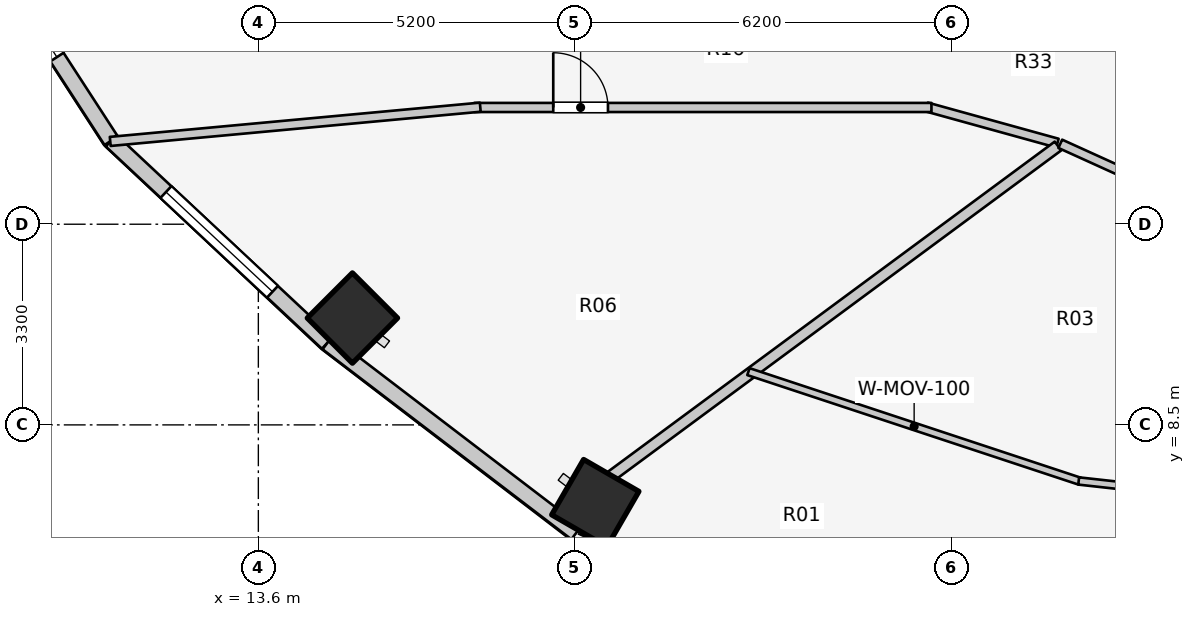
"""IFC4 building model, lengths in metres.
Left out: names, types, materials, properties, quantities, classifications, styles, units other than length and angle.
Written with IfcOpenShell. Run it as: python <this file> out.ifc"""

import sys

from ifc_helpers import new_model, si_unit, direction, frame, frame_2d, origin, origin_2d, place, context, subcontext, project, spatial, rectangle, extrude, element, fill, save


model = new_model("IFC4")
c1 = context("Model", 3, precision=1e-05, world=origin(), true_north=direction((0.0, 1.0)))
c2 = subcontext(c1, "Body", "Model", "MODEL_VIEW")
j1 = project(units=[si_unit("LENGTHUNIT", "METRE"), si_unit("PLANEANGLEUNIT", "RADIAN")], contexts=[c1])
p1 = place(None, origin())
s1 = spatial("IfcSite", under=j1, at=p1, CompositionType="ELEMENT")
p2 = place(p1, origin())
s2 = spatial("IfcBuilding", under=s1, at=p2, CompositionType="ELEMENT")
p3 = place(p2, frame((0.0, 0.0, 94.9)))
s3 = spatial("IfcBuildingStorey", under=s2, at=p3, CompositionType="ELEMENT", Elevation=94.9)
for number, where, z_axis, x_axis in (
    (1, (15.147, 10.257, 0.0), (0.0, 0.0, 1.0), (-0.707, -0.707, 0.0)),
    (2, (19.142, 7.214, 0.0), (0.0, 0.0, 1.0), (-0.5, -0.866, 0.0)),
):
    element("IfcColumn", number, at=place(p3, frame(where, z_axis=z_axis, x_axis=x_axis)), inside=s3, PredefinedType="COLUMN", context=c2, shape_type="SweptSolid", body=[
        extrude(rectangle(XDim=1.05, YDim=1.05, at=origin_2d()), origin(), (0.0, 0.0, 1.0), 3.1),
    ])
p4 = place(p3, frame((8.578, 17.181, 0.0), z_axis=(0.0, 0.0, 1.0), x_axis=(0.544388392991, -0.838833283541, 0.0)))
e3 = element("IfcWall", 3, at=p4, inside=s3, PredefinedType="STANDARD", context=c2, shape_type="SweptSolid", body=[
    extrude(rectangle(XDim=4.778, YDim=0.26, at=frame_2d((2.389, 0.0))), origin(), (0.0, 0.0, 1.0), 2.85),
])
p5 = place(p4, frame((1.639, 0.0, 0.75)))
e4 = element("IfcOpeningElement", 4, at=p5, cuts=e3, PredefinedType="OPENING", context=c2, shape_type="SweptSolid", body=[
    extrude(rectangle(XDim=1.5, YDim=1.6, at=frame_2d((0.75, 0.8))), frame((0.0, 0.14, 0.0), z_axis=(0.0, -1.0, 0.0), x_axis=(1.0, 0.0, 0.0)), (0.0, 0.0, 1.0), 0.28),
])
p6 = place(p3, frame((11.179, 13.173, 0.0), z_axis=(0.0, 0.0, 1.0), x_axis=(0.730162452258, -0.68327358599, 0.0)))
e5 = element("IfcWall", 5, at=p6, inside=s3, PredefinedType="STANDARD", context=c2, shape_type="SweptSolid", body=[
    extrude(rectangle(XDim=4.868, YDim=0.26, at=frame_2d((2.434, 0.0))), origin(), (0.0, 0.0, 1.0), 2.85),
])
p7 = place(p6, frame((1.234, 0.0, 0.75)))
e6 = element("IfcOpeningElement", 6, at=p7, cuts=e5, PredefinedType="OPENING", context=c2, shape_type="SweptSolid", body=[
    extrude(rectangle(XDim=2.4, YDim=1.7, at=frame_2d((1.2, 0.85))), frame((0.0, 0.14, 0.0), z_axis=(0.0, -1.0, 0.0), x_axis=(1.0, 0.0, 0.0)), (0.0, 0.0, 1.0), 0.28),
])
p8 = place(p3, frame((14.734, 9.847, 0.0), z_axis=(0.0, 0.0, 1.0), x_axis=(0.794809810864, -0.606858603427, 0.0)))
e7 = element("IfcWall", 7, at=p8, inside=s3, PredefinedType="STANDARD", context=c2, shape_type="SweptSolid", body=[
    extrude(rectangle(XDim=5.149, YDim=0.26, at=frame_2d((2.575, 0.0))), origin(), (0.0, 0.0, 1.0), 2.85),
])
p9 = place(p3, frame((26.742, 13.133, 0.0), z_axis=(0.0, 0.0, 1.0), x_axis=(-0.963833843713, 0.266503886865, 0.0)))
e8 = element("IfcWall", 8, at=p9, inside=s3, PredefinedType="PARTITIONING", context=c2, shape_type="SweptSolid", body=[
    extrude(rectangle(XDim=2.232, YDim=0.15, at=frame_2d((1.116, 0.0))), origin(), (0.0, 0.0, 1.0), 2.272),
])
p10 = place(p3, frame((17.15, 13.72, 0.0), z_axis=(0.0, 0.0, 1.0), x_axis=(1.0, 0.0, 0.0)))
e9 = element("IfcWall", 9, at=p10, inside=s3, PredefinedType="PARTITIONING", context=c2, shape_type="SweptSolid", body=[
    extrude(rectangle(XDim=7.52, YDim=0.15, at=frame_2d((3.76, 0.0))), origin(), (0.0, 0.0, 1.0), 2.272),
])
p11 = place(p10, frame((1.3, 0.0, 0.0)))
e10 = element("IfcOpeningElement", 10, at=p11, cuts=e9, PredefinedType="OPENING", context=c2, shape_type="SweptSolid", body=[
    extrude(rectangle(XDim=0.9, YDim=2.1, at=frame_2d((0.45, 1.05))), frame((0.0, 0.085, 0.0), z_axis=(0.0, -1.0, 0.0), x_axis=(1.0, 0.0, 0.0)), (0.0, 0.0, 1.0), 0.17),
])
p12 = place(p3, frame((17.25, 13.725, 0.0), z_axis=(0.0, 0.0, 1.0), x_axis=(-0.995748209098, -0.092116795851, 0.0)))
e11 = element("IfcWall", 11, at=p12, inside=s3, PredefinedType="PARTITIONING", context=c2, shape_type="SweptSolid", body=[
    extrude(rectangle(XDim=6.112, YDim=0.15, at=frame_2d((3.056, 0.0))), origin(), (0.0, 0.0, 1.0), 2.142),
])
p13 = place(p3, frame((26.751, 13.086, 0.0), z_axis=(0.0, 0.0, 1.0), x_axis=(-0.80430981394, -0.594210167533, 0.0)))
e12 = element("IfcWall", 12, at=p13, inside=s3, PredefinedType="PARTITIONING", context=c2, shape_type="SweptSolid", body=[
    extrude(rectangle(XDim=9.146, YDim=0.18, at=frame_2d((4.573, 0.0))), origin(), (0.0, 0.0, 1.0), 2.272),
])
p14 = place(p3, frame((21.66, 9.376, 0.0), z_axis=(0.0, 0.0, 1.0), x_axis=(0.949429126756, -0.313981421852, 0.0)))
e13 = element("IfcWall", 13, at=p14, inside=s3, PredefinedType="MOVABLE", context=c2, shape_type="SweptSolid", body=[
    extrude(rectangle(XDim=5.741, YDim=0.12, at=frame_2d((2.87, 0.0))), origin(), (0.0, 0.0, 1.0), 2.272),
])
p15 = place(p3, frame((27.091, 7.578, 0.0), z_axis=(0.0, 0.0, 1.0), x_axis=(0.993892154322, -0.110355722898, 0.0)))
e14 = element("IfcWall", 14, at=p15, inside=s3, PredefinedType="MOVABLE", context=c2, shape_type="SweptSolid", body=[
    extrude(rectangle(XDim=4.949, YDim=0.12, at=frame_2d((2.475, 0.0))), origin(), (0.0, 0.0, 1.0), 2.272),
])
p16 = place(p15, frame((2.0, 0.0, 0.0)))
e15 = element("IfcOpeningElement", 15, at=p16, cuts=e14, PredefinedType="OPENING", context=c2, shape_type="SweptSolid", body=[
    extrude(rectangle(XDim=0.95, YDim=2.1, at=frame_2d((0.475, 1.05))), frame((0.0, 0.07, 0.0), z_axis=(0.0, -1.0, 0.0), x_axis=(1.0, 0.0, 0.0)), (0.0, 0.0, 1.0), 0.14),
])
p17 = place(p3, frame((26.789, 13.123, 0.0), z_axis=(0.0, 0.0, 1.0), x_axis=(0.910568469686, -0.41335827319, 0.0)))
e16 = element("IfcWall", 16, at=p17, inside=s3, PredefinedType="PARTITIONING", context=c2, shape_type="SweptSolid", body=[
    extrude(rectangle(XDim=2.772, YDim=0.15, at=frame_2d((1.386, 0.0))), origin(), (0.0, 0.0, 1.0), 2.272),
])
p18 = place(p5, origin())
e17 = element("IfcWindow", 17, at=p18, inside=s3, PartitioningType="SINGLE_PANEL", PredefinedType="WINDOW", context=c2, shape_type="SweptSolid", body=[
    extrude(rectangle(XDim=1.5, YDim=1.6, at=frame_2d((0.75, 0.8))), frame((0.0, 0.03, 0.0), z_axis=(0.0, -1.0, 0.0), x_axis=(1.0, 0.0, 0.0)), (0.0, 0.0, 1.0), 0.06),
])
fill(e4, e17)
p19 = place(p7, origin())
e18 = element("IfcWindow", 18, at=p19, inside=s3, PartitioningType="SINGLE_PANEL", PredefinedType="WINDOW", context=c2, shape_type="SweptSolid", body=[
    extrude(rectangle(XDim=2.4, YDim=1.7, at=frame_2d((1.2, 0.85))), frame((0.0, 0.03, 0.0), z_axis=(0.0, -1.0, 0.0), x_axis=(1.0, 0.0, 0.0)), (0.0, 0.0, 1.0), 0.06),
])
fill(e6, e18)
p20 = place(p11, origin())
e19 = element("IfcDoor", 19, at=p20, inside=s3, OperationType="SINGLE_SWING_LEFT", PredefinedType="DOOR", context=c2, shape_type="SweptSolid", body=[
    extrude(rectangle(XDim=0.9, YDim=2.1, at=frame_2d((0.45, 1.05))), frame((0.0, 0.025, 0.0), z_axis=(0.0, -1.0, 0.0), x_axis=(1.0, 0.0, 0.0)), (0.0, 0.0, 1.0), 0.05),
])
fill(e10, e19)
save(model, sys.argv[1])
